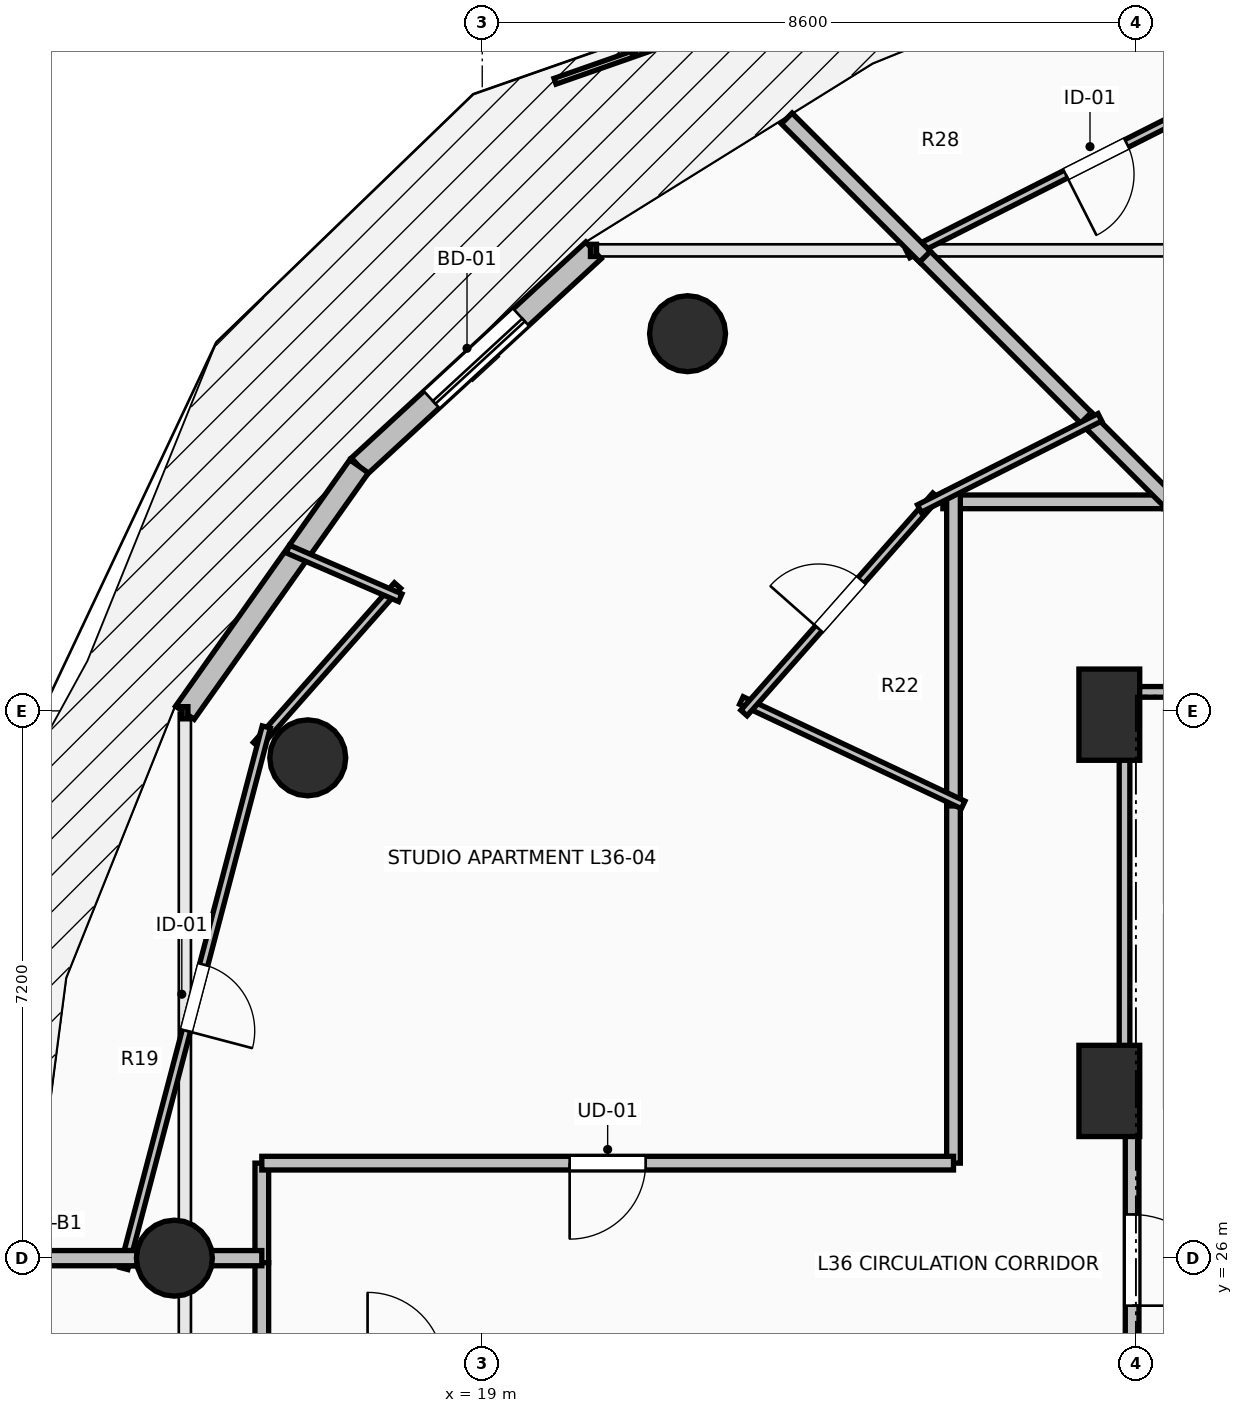
"""IFC4 building model, lengths in metres.
Left out: names, types, materials, properties, quantities, classifications, styles, units other than length and angle.
Written with IfcOpenShell. Run it as: python <this file> out.ifc"""

import sys

from ifc_helpers import new_model, si_unit, direction, frame, frame_2d, origin, origin_2d, place, context, subcontext, project, spatial, rectangle, circle, extrude, element, fill, save


model = new_model("IFC4")
c1 = context("Model", 3, precision=1e-05, world=origin(), true_north=direction((0.0, 1.0)))
c2 = subcontext(c1, "Body", "Model", "MODEL_VIEW")
j1 = project(units=[si_unit("LENGTHUNIT", "METRE"), si_unit("PLANEANGLEUNIT", "RADIAN")], contexts=[c1])
p1 = place(None, origin())
s1 = spatial("IfcSite", under=j1, at=p1, CompositionType="ELEMENT")
p2 = place(p1, origin())
s2 = spatial("IfcBuilding", under=s1, at=p2, CompositionType="ELEMENT")
p3 = place(p2, frame((0.0, 0.0, 136.1)))
s3 = spatial("IfcBuildingStorey", under=s2, at=p3, CompositionType="ELEMENT", Elevation=136.1)
for number, where, z_axis, x_axis in (
    (1, (21.701, 38.162, 0.0), (0.0, 0.0, 1.0), (-0.707, 0.707, 0.0)),
    (2, (16.705, 32.582, 0.0), (0.0, 0.0, 1.0), (-0.924, 0.383, 0.0)),
    (3, (14.95, 26.0, 0.0), (0.0, 0.0, 1.0), (-1.0, 0.0, 0.0)),
):
    element("IfcColumn", number, at=place(p3, frame(where, z_axis=z_axis, x_axis=x_axis)), inside=s3, PredefinedType="COLUMN", context=c2, shape_type="SweptSolid", body=[
        extrude(circle(Radius=0.5, at=origin_2d()), origin(), (0.0, 0.0, 1.0), 3.5),
    ])
for number, where, z_axis, x_axis in (
    (4, (27.25, 28.2, 0.0), (0.0, 0.0, 1.0), (1.0, 0.0, 0.0)),
    (5, (27.25, 33.15, 0.0), (0.0, 0.0, 1.0), (1.0, 0.0, 0.0)),
):
    element("IfcColumn", number, at=place(p3, frame(where, z_axis=z_axis, x_axis=x_axis)), inside=s3, PredefinedType="PILASTER", context=c2, shape_type="SweptSolid", body=[
        extrude(rectangle(XDim=0.8, YDim=1.2, at=origin_2d()), origin(), (0.0, 0.0, 1.0), 3.5),
    ])
p4 = place(p3, frame((20.464, 39.258, 0.0), z_axis=(0.0, 0.0, 1.0), x_axis=(-0.735477154165, -0.677549522693, 0.0)))
e6 = element("IfcWall", 6, at=p4, inside=s3, PredefinedType="STANDARD", context=c2, shape_type="SweptSolid", body=[
    extrude(rectangle(XDim=4.194, YDim=0.3, at=frame_2d((2.097, 0.0))), origin(), (0.0, 0.0, 1.0), 3.24),
])
p5 = place(p4, frame((1.297, 0.0, 0.0)))
e7 = element("IfcOpeningElement", 7, at=p5, cuts=e6, PredefinedType="OPENING", context=c2, shape_type="SweptSolid", body=[
    extrude(rectangle(XDim=1.6, YDim=2.3, at=frame_2d((0.8, 1.15))), frame((0.0, 0.165, 0.0), z_axis=(0.0, -1.0, 0.0), x_axis=(1.0, 0.0, 0.0)), (0.0, 0.0, 1.0), 0.33),
])
p6 = place(p3, frame((17.38, 36.417, 0.0), z_axis=(0.0, 0.0, 1.0), x_axis=(-0.577269753207, -0.816553508371, 0.0)))
e8 = element("IfcWall", 8, at=p6, inside=s3, PredefinedType="STANDARD", context=c2, shape_type="SweptSolid", body=[
    extrude(rectangle(XDim=3.97, YDim=0.3, at=frame_2d((1.985, 0.0))), origin(), (0.0, 0.0, 1.0), 3.24),
])
p7 = place(p3, frame((27.55, 28.0, 0.0), z_axis=(0.0, 0.0, 1.0), x_axis=(0.0, -1.0, 0.0)))
e9 = element("IfcWall", 9, at=p7, inside=s3, PredefinedType="PARTITIONING", context=c2, shape_type="SweptSolid", body=[
    extrude(rectangle(XDim=4.05, YDim=0.18, at=frame_2d((2.025, 0.0))), origin(), (0.0, 0.0, 1.0), 3.24),
])
p8 = place(p7, frame((1.425, 0.0, 0.0)))
e10 = element("IfcOpeningElement", 10, at=p8, cuts=e9, PredefinedType="OPENING", context=c2, shape_type="SweptSolid", body=[
    extrude(rectangle(XDim=1.2, YDim=2.15, at=frame_2d((0.6, 1.075))), frame((0.0, 0.105, 0.0), z_axis=(0.0, -1.0, 0.0), x_axis=(1.0, 0.0, 0.0)), (0.0, 0.0, 1.0), 0.21),
])
p9 = place(p3, frame((34.478, 35.95, 0.0), z_axis=(0.0, 0.0, 1.0), x_axis=(-1.0, 0.0, 0.0)))
e11 = element("IfcWall", 11, at=p9, inside=s3, PredefinedType="PARTITIONING", context=c2, shape_type="SweptSolid", body=[
    extrude(rectangle(XDim=6.513, YDim=0.18, at=frame_2d((3.256, 0.0))), origin(), (0.0, 0.0, 1.0), 2.432),
])
p10 = place(p9, frame((2.757, 0.0, 0.0)))
e12 = element("IfcOpeningElement", 12, at=p10, cuts=e11, PredefinedType="OPENING", context=c2, shape_type="SweptSolid", body=[
    extrude(rectangle(XDim=1.0, YDim=2.15, at=frame_2d((0.5, 1.075))), frame((0.0, 0.105, 0.0), z_axis=(0.0, -1.0, 0.0), x_axis=(1.0, 0.0, 0.0)), (0.0, 0.0, 1.0), 0.21),
])
p11 = place(p3, frame((16.1, 27.25, 0.0), z_axis=(0.0, 0.0, 1.0), x_axis=(0.0, -1.0, 0.0)))
e13 = element("IfcWall", 13, at=p11, inside=s3, PredefinedType="PARTITIONING", context=c2, shape_type="SweptSolid", body=[
    extrude(rectangle(XDim=1.31, YDim=0.18, at=frame_2d((0.655, 0.0))), origin(), (0.0, 0.0, 1.0), 2.432),
])
p12 = place(p3, frame((25.2, 32.089, 0.0), z_axis=(0.0, 0.0, 1.0), x_axis=(0.0, -1.0, 0.0)))
e14 = element("IfcWall", 14, at=p12, inside=s3, PredefinedType="PARTITIONING", context=c2, shape_type="SweptSolid", body=[
    extrude(rectangle(XDim=4.839, YDim=0.18, at=frame_2d((2.419, 0.0))), origin(), (0.0, 0.0, 1.0), 2.432),
])
p13 = place(p3, frame((25.2, 27.25, 0.0), z_axis=(0.0, 0.0, 1.0), x_axis=(-1.0, 0.0, 0.0)))
e15 = element("IfcWall", 15, at=p13, inside=s3, PredefinedType="PARTITIONING", context=c2, shape_type="SweptSolid", body=[
    extrude(rectangle(XDim=9.1, YDim=0.18, at=frame_2d((4.55, 0.0))), origin(), (0.0, 0.0, 1.0), 2.432),
])
p14 = place(p13, frame((4.05, 0.0, 0.0)))
e16 = element("IfcOpeningElement", 16, at=p14, cuts=e15, PredefinedType="OPENING", context=c2, shape_type="SweptSolid", body=[
    extrude(rectangle(XDim=1.0, YDim=2.15, at=frame_2d((0.5, 1.075))), frame((0.0, 0.105, 0.0), z_axis=(0.0, -1.0, 0.0), x_axis=(1.0, 0.0, 0.0)), (0.0, 0.0, 1.0), 0.21),
])
p15 = place(p3, frame((28.105, 35.95, 0.0), z_axis=(0.0, 0.0, 1.0), x_axis=(-1.0, 0.0, 0.0)))
e17 = element("IfcWall", 17, at=p15, inside=s3, PredefinedType="PARTITIONING", context=c2, shape_type="SweptSolid", body=[
    extrude(rectangle(XDim=3.045, YDim=0.18, at=frame_2d((1.522, 0.0))), origin(), (0.0, 0.0, 1.0), 2.432),
])
p16 = place(p3, frame((25.2, 36.09, 0.0), z_axis=(0.0, 0.0, 1.0), x_axis=(0.0, -1.0, 0.0)))
e18 = element("IfcWall", 18, at=p16, inside=s3, PredefinedType="PARTITIONING", context=c2, shape_type="SweptSolid", body=[
    extrude(rectangle(XDim=4.141, YDim=0.18, at=frame_2d((2.071, 0.0))), origin(), (0.0, 0.0, 1.0), 2.432),
])
p17 = place(p3, frame((16.1, 25.94, 0.0), z_axis=(0.0, 0.0, 1.0), x_axis=(0.0, -1.0, 0.0)))
e19 = element("IfcWall", 19, at=p17, inside=s3, PredefinedType="PARTITIONING", context=c2, shape_type="SweptSolid", body=[
    extrude(rectangle(XDim=1.39, YDim=0.18, at=frame_2d((0.695, 0.0))), origin(), (0.0, 0.0, 1.0), 2.432),
])
p18 = place(p3, frame((29.553, 41.714, 0.0), z_axis=(0.0, 0.0, 1.0), x_axis=(-0.892438454993, -0.451169152369, 0.0)))
e20 = element("IfcWall", 20, at=p18, inside=s3, PredefinedType="PARTITIONING", context=c2, shape_type="SweptSolid", body=[
    extrude(rectangle(XDim=5.549, YDim=0.11, at=frame_2d((2.774, 0.0))), origin(), (0.0, 0.0, 1.0), 2.432),
])
p19 = place(p18, frame((2.324, 0.0, 0.0)))
e21 = element("IfcOpeningElement", 21, at=p19, cuts=e20, PredefinedType="OPENING", context=c2, shape_type="SweptSolid", body=[
    extrude(rectangle(XDim=0.9, YDim=2.1, at=frame_2d((0.45, 1.05))), frame((0.0, 0.07, 0.0), z_axis=(0.0, -1.0, 0.0), x_axis=(1.0, 0.0, 0.0)), (0.0, 0.0, 1.0), 0.14),
])
p20 = place(p3, frame((24.726, 39.274, 0.0), z_axis=(0.0, 0.0, 1.0), x_axis=(0.707106781187, -0.707106781187, 0.0)))
e22 = element("IfcWall", 22, at=p20, inside=s3, PredefinedType="PARTITIONING", context=c2, shape_type="SweptSolid", body=[
    extrude(rectangle(XDim=3.277, YDim=0.2, at=frame_2d((1.638, 0.0))), origin(), (0.0, 0.0, 1.0), 2.874),
])
p21 = place(p3, frame((26.944, 37.056, 0.0), z_axis=(0.0, 0.0, 1.0), x_axis=(0.707106781187, -0.707106781187, 0.0)))
e23 = element("IfcWall", 23, at=p21, inside=s3, PredefinedType="PARTITIONING", context=c2, shape_type="SweptSolid", body=[
    extrude(rectangle(XDim=1.704, YDim=0.2, at=frame_2d((0.852, 0.0))), origin(), (0.0, 0.0, 1.0), 2.432),
])
p22 = place(p3, frame((23.006, 40.994, 0.0), z_axis=(0.0, 0.0, 1.0), x_axis=(0.707106781187, -0.707106781187, 0.0)))
e24 = element("IfcWall", 24, at=p22, inside=s3, PredefinedType="PARTITIONING", context=c2, shape_type="SweptSolid", body=[
    extrude(rectangle(XDim=2.572, YDim=0.2, at=frame_2d((1.286, 0.0))), origin(), (0.0, 0.0, 1.0), 2.728),
])
p23 = place(p3, frame((25.327, 31.963, 0.0), z_axis=(0.0, 0.0, 1.0), x_axis=(-0.904775800467, 0.425888190596, 0.0)))
e25 = element("IfcWall", 25, at=p23, inside=s3, PredefinedType="PARTITIONING", context=c2, shape_type="SweptSolid", body=[
    extrude(rectangle(XDim=3.225, YDim=0.11, at=frame_2d((1.612, 0.0))), origin(), (0.0, 0.0, 1.0), 2.922),
])
p24 = place(p3, frame((22.443, 33.172, 0.0), z_axis=(0.0, 0.0, 1.0), x_axis=(0.662199468358, 0.749327607997, 0.0)))
e26 = element("IfcWall", 26, at=p24, inside=s3, PredefinedType="PARTITIONING", context=c2, shape_type="SweptSolid", body=[
    extrude(rectangle(XDim=3.814, YDim=0.11, at=frame_2d((1.907, 0.0))), origin(), (0.0, 0.0, 1.0), 2.432),
])
p25 = place(p24, frame((1.482, 0.0, 0.0)))
e27 = element("IfcOpeningElement", 27, at=p25, cuts=e26, PredefinedType="OPENING", context=c2, shape_type="SweptSolid", body=[
    extrude(rectangle(XDim=0.85, YDim=2.1, at=frame_2d((0.425, 1.05))), frame((0.0, 0.07, 0.0), z_axis=(0.0, -1.0, 0.0), x_axis=(1.0, 0.0, 0.0)), (0.0, 0.0, 1.0), 0.14),
])
p26 = place(p3, frame((24.751, 35.862, 0.0), z_axis=(0.0, 0.0, 1.0), x_axis=(0.892455114256, 0.451136197882, 0.0)))
e28 = element("IfcWall", 28, at=p26, inside=s3, PredefinedType="PARTITIONING", context=c2, shape_type="SweptSolid", body=[
    extrude(rectangle(XDim=2.661, YDim=0.11, at=frame_2d((1.331, 0.0))), origin(), (0.0, 0.0, 1.0), 3.24),
])
p27 = place(p3, frame((17.886, 34.849, 0.0), z_axis=(0.0, 0.0, 1.0), x_axis=(-0.661981664989, -0.749520029898, 0.0)))
e29 = element("IfcWall", 29, at=p27, inside=s3, PredefinedType="PARTITIONING", context=c2, shape_type="SweptSolid", body=[
    extrude(rectangle(XDim=2.803, YDim=0.11, at=frame_2d((1.401, 0.0))), origin(), (0.0, 0.0, 1.0), 3.24),
])
p28 = place(p3, frame((16.159, 32.988, 0.0), z_axis=(0.0, 0.0, 1.0), x_axis=(-0.254441093922, -0.967088274008, 0.0)))
e30 = element("IfcWall", 30, at=p28, inside=s3, PredefinedType="PARTITIONING", context=c2, shape_type="SweptSolid", body=[
    extrude(rectangle(XDim=7.366, YDim=0.11, at=frame_2d((3.683, 0.0))), origin(), (0.0, 0.0, 1.0), 3.24),
])
p29 = place(p28, frame((3.233, 0.0, 0.0)))
e31 = element("IfcOpeningElement", 31, at=p29, cuts=e30, PredefinedType="OPENING", context=c2, shape_type="SweptSolid", body=[
    extrude(rectangle(XDim=0.9, YDim=2.1, at=frame_2d((0.45, 1.05))), frame((0.0, 0.07, 0.0), z_axis=(0.0, -1.0, 0.0), x_axis=(1.0, 0.0, 0.0)), (0.0, 0.0, 1.0), 0.14),
])
p30 = place(p3, frame((16.444, 35.329, 0.0), z_axis=(0.0, 0.0, 1.0), x_axis=(0.917553781871, -0.397611691698, 0.0)))
e32 = element("IfcWall", 32, at=p30, inside=s3, PredefinedType="PARTITIONING", context=c2, shape_type="SweptSolid", body=[
    extrude(rectangle(XDim=1.611, YDim=0.11, at=frame_2d((0.805, 0.0))), origin(), (0.0, 0.0, 1.0), 3.24),
])
p31 = place(p3, frame((14.32, 26.0, 0.0), z_axis=(0.0, 0.0, 1.0), x_axis=(1.0, 0.0, 0.0)))
e33 = element("IfcWall", 33, at=p31, inside=s3, PredefinedType="PARTITIONING", context=c2, shape_type="SweptSolid", body=[
    extrude(rectangle(XDim=1.78, YDim=0.2, at=frame_2d((0.89, 0.0))), origin(), (0.0, 0.0, 1.0), 2.432),
])
p32 = place(p3, frame((13.061, 26.0, 0.0), z_axis=(0.0, 0.0, 1.0), x_axis=(1.0, 0.0, 0.0)))
e34 = element("IfcWall", 34, at=p32, inside=s3, PredefinedType="PARTITIONING", context=c2, shape_type="SweptSolid", body=[
    extrude(rectangle(XDim=1.399, YDim=0.2, at=frame_2d((0.699, 0.0))), origin(), (0.0, 0.0, 1.0), 3.24),
])
p33 = place(p3, frame((28.894, 33.45, 0.0), z_axis=(0.0, 0.0, 1.0), x_axis=(-1.0, 0.0, 0.0)))
e35 = element("IfcWall", 35, at=p33, inside=s3, PredefinedType="PARTITIONING", context=c2, shape_type="SweptSolid", body=[
    extrude(rectangle(XDim=1.444, YDim=0.14, at=frame_2d((0.722, 0.0))), origin(), (0.0, 0.0, 1.0), 2.432),
])
p34 = place(p3, frame((27.45, 33.45, 0.0), z_axis=(0.0, 0.0, 1.0), x_axis=(0.0, -1.0, 0.0)))
e36 = element("IfcWall", 36, at=p34, inside=s3, PredefinedType="PARTITIONING", context=c2, shape_type="SweptSolid", body=[
    extrude(rectangle(XDim=5.254, YDim=0.14, at=frame_2d((2.627, 0.0))), origin(), (0.0, 0.0, 1.0), 2.432),
])
p35 = place(p5, origin())
e37 = element("IfcDoor", 37, at=p35, inside=s3, OperationType="SLIDING_TO_LEFT", PredefinedType="DOOR", context=c2, shape_type="SweptSolid", body=[
    extrude(rectangle(XDim=1.6, YDim=2.3, at=frame_2d((0.8, 1.15))), frame((0.0, 0.025, 0.0), z_axis=(0.0, -1.0, 0.0), x_axis=(1.0, 0.0, 0.0)), (0.0, 0.0, 1.0), 0.05),
])
fill(e7, e37)
p36 = place(p8, origin())
e38 = element("IfcDoor", 38, at=p36, inside=s3, OperationType="SINGLE_SWING_RIGHT", PredefinedType="DOOR", context=c2, shape_type="SweptSolid", body=[
    extrude(rectangle(XDim=1.2, YDim=2.15, at=frame_2d((0.6, 1.075))), frame((0.0, 0.025, 0.0), z_axis=(0.0, -1.0, 0.0), x_axis=(1.0, 0.0, 0.0)), (0.0, 0.0, 1.0), 0.05),
])
fill(e10, e38)
p37 = place(p14, origin())
e39 = element("IfcDoor", 39, at=p37, inside=s3, OperationType="SINGLE_SWING_RIGHT", PredefinedType="DOOR", context=c2, shape_type="SweptSolid", body=[
    extrude(rectangle(XDim=1.0, YDim=2.15, at=frame_2d((0.5, 1.075))), frame((0.0, 0.025, 0.0), z_axis=(0.0, -1.0, 0.0), x_axis=(1.0, 0.0, 0.0)), (0.0, 0.0, 1.0), 0.05),
])
fill(e16, e39)
p38 = place(p19, origin())
e40 = element("IfcDoor", 40, at=p38, inside=s3, OperationType="SINGLE_SWING_RIGHT", PredefinedType="DOOR", context=c2, shape_type="SweptSolid", body=[
    extrude(rectangle(XDim=0.9, YDim=2.1, at=frame_2d((0.45, 1.05))), frame((0.0, 0.025, 0.0), z_axis=(0.0, -1.0, 0.0), x_axis=(1.0, 0.0, 0.0)), (0.0, 0.0, 1.0), 0.05),
])
fill(e21, e40)
p39 = place(p25, origin())
e41 = element("IfcDoor", 41, at=p39, inside=s3, OperationType="SINGLE_SWING_LEFT", PredefinedType="DOOR", context=c2, shape_type="SweptSolid", body=[
    extrude(rectangle(XDim=0.85, YDim=2.1, at=frame_2d((0.425, 1.05))), frame((0.0, 0.025, 0.0), z_axis=(0.0, -1.0, 0.0), x_axis=(1.0, 0.0, 0.0)), (0.0, 0.0, 1.0), 0.05),
])
fill(e27, e41)
p40 = place(p29, origin())
e42 = element("IfcDoor", 42, at=p40, inside=s3, OperationType="SINGLE_SWING_RIGHT", PredefinedType="DOOR", context=c2, shape_type="SweptSolid", body=[
    extrude(rectangle(XDim=0.9, YDim=2.1, at=frame_2d((0.45, 1.05))), frame((0.0, 0.025, 0.0), z_axis=(0.0, -1.0, 0.0), x_axis=(1.0, 0.0, 0.0)), (0.0, 0.0, 1.0), 0.05),
])
fill(e31, e42)
save(model, sys.argv[1])
